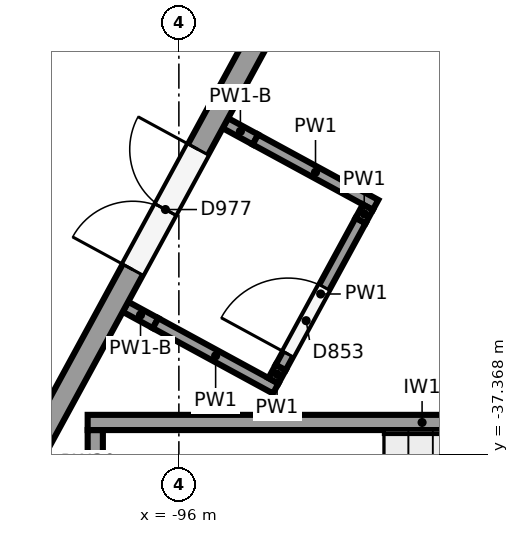
"""IFC4 building model, lengths in metres.
Left out: names, types, materials, properties, quantities, classifications, styles, units other than length and angle.
Written with IfcOpenShell. Run it as: python <this file> out.ifc"""

import sys

from ifc_helpers import new_model, si_unit, direction, frame, frame_2d, origin, place, context, subcontext, project, spatial, rectangle, extrude, element, fill, save


model = new_model("IFC4")
c1 = context("Model", 3, precision=1e-05, world=origin(), true_north=direction((0.0, 1.0)))
c2 = subcontext(c1, "Body", "Model", "MODEL_VIEW")
j1 = project(units=[si_unit("LENGTHUNIT", "METRE"), si_unit("PLANEANGLEUNIT", "RADIAN")], contexts=[c1])
p1 = place(None, origin())
s1 = spatial("IfcSite", under=j1, at=p1, CompositionType="ELEMENT")
p2 = place(p1, origin())
s2 = spatial("IfcBuilding", under=s1, at=p2, CompositionType="ELEMENT")
p3 = place(p2, origin())
s3 = spatial("IfcBuildingStorey", under=s2, at=p3, CompositionType="ELEMENT", Elevation=0.0)
p4 = place(p3, frame((-101.161, -43.311, 0.0), z_axis=(0.0, 0.0, 1.0), x_axis=(0.477867771117, 0.878431780691, 0.0)))
e1 = element("IfcWall", 1, at=p4, inside=s3, PredefinedType="SOLIDWALL", context=c2, shape_type="SweptSolid", body=[
    extrude(rectangle(XDim=13.28, YDim=0.3, at=frame_2d((6.64, 0.0))), origin(), (0.0, 0.0, 1.0), 4.85),
])
p5 = place(p4, frame((9.53, 0.0, 0.0)))
e2 = element("IfcOpeningElement", 2, at=p5, cuts=e1, PredefinedType="OPENING", context=c2, shape_type="SweptSolid", body=[
    extrude(rectangle(XDim=1.8, YDim=2.4, at=frame_2d((0.9, 1.2))), frame((0.0, 0.16, 0.0), z_axis=(0.0, -1.0, 0.0), x_axis=(1.0, 0.0, 0.0)), (0.0, 0.0, 1.0), 0.32),
])
p6 = place(p3, frame((-97.2, -36.95, 0.0), z_axis=(0.0, 0.0, 1.0), x_axis=(1.0, 0.0, 0.0)))
e3 = element("IfcWall", 3, at=p6, inside=s3, PredefinedType="SHEAR", context=c2, shape_type="SweptSolid", body=[
    extrude(rectangle(XDim=8.8, YDim=0.2, at=frame_2d((4.4, 0.0))), origin(), (0.0, 0.0, 1.0), 6.15),
])
p7 = place(p3, frame((-97.1, -37.05, 0.0), z_axis=(0.0, 0.0, 1.0), x_axis=(0.0, -1.0, 0.0)))
e4 = element("IfcWall", 4, at=p7, inside=s3, PredefinedType="SHEAR", context=c2, shape_type="SweptSolid", body=[
    extrude(rectangle(XDim=6.6, YDim=0.2, at=frame_2d((3.3, 0.0))), origin(), (0.0, 0.0, 1.0), 6.15),
])
p8 = place(p3, frame((-96.702, -35.428, 0.0), z_axis=(0.0, 0.0, 1.0), x_axis=(0.878372019733, -0.477977609256, 0.0)))
e5 = element("IfcWall", 5, at=p8, inside=s3, PredefinedType="PARTITIONING", context=c2, shape_type="SweptSolid", body=[
    extrude(rectangle(XDim=0.45, YDim=0.15, at=frame_2d((0.225, 0.0))), origin(), (0.0, 0.0, 1.0), 4.85),
])
p9 = place(p3, frame((-96.307, -35.643, 0.0), z_axis=(0.0, 0.0, 1.0), x_axis=(0.878428962466, -0.477872951632, 0.0)))
e6 = element("IfcWall", 6, at=p9, inside=s3, PredefinedType="PARTITIONING", context=c2, shape_type="SweptSolid", body=[
    extrude(rectangle(XDim=1.8, YDim=0.15, at=frame_2d((0.9, 0.0))), origin(), (0.0, 0.0, 1.0), 6.15),
])
p10 = place(p3, frame((-95.388, -33.013, 0.0), z_axis=(0.0, 0.0, 1.0), x_axis=(0.878372019733, -0.477977609256, 0.0)))
e7 = element("IfcWall", 7, at=p10, inside=s3, PredefinedType="PARTITIONING", context=c2, shape_type="SweptSolid", body=[
    extrude(rectangle(XDim=0.45, YDim=0.15, at=frame_2d((0.225, 0.0))), origin(), (0.0, 0.0, 1.0), 4.85),
])
p11 = place(p3, frame((-94.993, -33.228, 0.0), z_axis=(0.0, 0.0, 1.0), x_axis=(0.878459932885, -0.477816017223, 0.0)))
e8 = element("IfcWall", 8, at=p11, inside=s3, PredefinedType="PARTITIONING", context=c2, shape_type="SweptSolid", body=[
    extrude(rectangle(XDim=1.8, YDim=0.15, at=frame_2d((0.9, 0.0))), origin(), (0.0, 0.0, 1.0), 6.15),
])
p12 = place(p3, frame((-94.756, -36.402, 0.0), z_axis=(0.0, 0.0, 1.0), x_axis=(0.478168266369, 0.878268244352, 0.0)))
e9 = element("IfcWall", 9, at=p12, inside=s3, PredefinedType="PARTITIONING", context=c2, shape_type="SweptSolid", body=[
    extrude(rectangle(XDim=0.2, YDim=0.15, at=frame_2d((0.1, 0.0))), origin(), (0.0, 0.0, 1.0), 6.15),
])
p13 = place(p3, frame((-94.66, -36.226, 0.0), z_axis=(0.0, 0.0, 1.0), x_axis=(0.477887643273, 0.878420969927, 0.0)))
e10 = element("IfcWall", 10, at=p13, inside=s3, PredefinedType="PARTITIONING", context=c2, shape_type="SweptSolid", body=[
    extrude(rectangle(XDim=2.2, YDim=0.15, at=frame_2d((1.1, 0.0))), origin(), (0.0, 0.0, 1.0), 6.15),
])
p14 = place(p13, frame((0.2, 0.0, 0.0)))
e11 = element("IfcOpeningElement", 11, at=p14, cuts=e10, PredefinedType="OPENING", context=c2, shape_type="SweptSolid", body=[
    extrude(rectangle(XDim=1.0, YDim=2.1, at=frame_2d((0.5, 1.05))), frame((0.0, 0.085, 0.0), z_axis=(0.0, -1.0, 0.0), x_axis=(1.0, 0.0, 0.0)), (0.0, 0.0, 1.0), 0.17),
])
p15 = place(p3, frame((-93.609, -34.294, 0.0), z_axis=(0.0, 0.0, 1.0), x_axis=(0.477226530971, 0.878780312785, 0.0)))
e12 = element("IfcWall", 12, at=p15, inside=s3, PredefinedType="PARTITIONING", context=c2, shape_type="SweptSolid", body=[
    extrude(rectangle(XDim=0.2, YDim=0.15, at=frame_2d((0.1, 0.0))), origin(), (0.0, 0.0, 1.0), 6.15),
])
p16 = place(p5, origin())
e13 = element("IfcDoor", 13, at=p16, inside=s3, OperationType="DOUBLE_DOOR_SINGLE_SWING", PredefinedType="DOOR", context=c2, shape_type="SweptSolid", body=[
    extrude(rectangle(XDim=1.8, YDim=2.4, at=frame_2d((0.9, 1.2))), frame((0.0, 0.025, 0.0), z_axis=(0.0, -1.0, 0.0), x_axis=(1.0, 0.0, 0.0)), (0.0, 0.0, 1.0), 0.05),
])
fill(e2, e13)
p17 = place(p14, origin())
e14 = element("IfcDoor", 14, at=p17, inside=s3, OperationType="SINGLE_SWING_LEFT", PredefinedType="DOOR", context=c2, shape_type="SweptSolid", body=[
    extrude(rectangle(XDim=1.0, YDim=2.1, at=frame_2d((0.5, 1.05))), frame((0.0, 0.025, 0.0), z_axis=(0.0, -1.0, 0.0), x_axis=(1.0, 0.0, 0.0)), (0.0, 0.0, 1.0), 0.05),
])
fill(e11, e14)
save(model, sys.argv[1])
